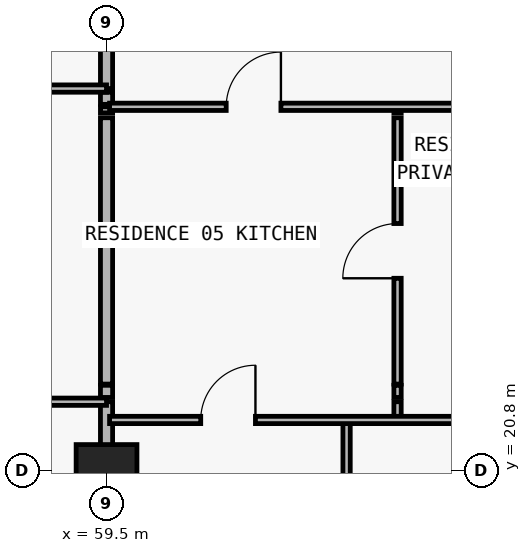
"""IFC4 building model, lengths in metres.
Left out: names, types, materials, properties, quantities, classifications, styles, units other than length and angle.
Written with IfcOpenShell. Run it as: python <this file> out.ifc"""

import sys

from ifc_helpers import new_model, si_unit, direction, frame, frame_2d, origin, origin_2d, place, context, subcontext, project, spatial, rectangle, extrude, element, fill, save


model = new_model("IFC4")
c1 = context("Model", 3, precision=1e-05, world=origin(), true_north=direction((0.0, 1.0)))
c2 = subcontext(c1, "Body", "Model", "MODEL_VIEW")
j1 = project(units=[si_unit("LENGTHUNIT", "METRE"), si_unit("PLANEANGLEUNIT", "RADIAN")], contexts=[c1])
p1 = place(None, origin())
s1 = spatial("IfcSite", under=j1, at=p1, CompositionType="ELEMENT")
p2 = place(p1, origin())
s2 = spatial("IfcBuilding", under=s1, at=p2, CompositionType="ELEMENT")
p3 = place(p2, frame((0.0, 0.0, 112.5)))
s3 = spatial("IfcBuildingStorey", under=s2, at=p3, CompositionType="ELEMENT", Elevation=112.5)
p4 = place(p3, frame((59.5, 20.8, 0.0), z_axis=(0.0, 0.0, 1.0), x_axis=(1.0, 0.0, 0.0)))
e1 = element("IfcColumn", 1, at=p4, inside=s3, PredefinedType="COLUMN", context=c2, shape_type="SweptSolid", body=[
    extrude(rectangle(XDim=1.0, YDim=0.85, at=origin_2d()), origin(), (0.0, 0.0, 1.0), 3.05),
])
p5 = place(p3, frame((59.5, 8.84, 0.0), z_axis=(0.0, 0.0, 1.0), x_axis=(0.0, 1.0, 0.0)))
e2 = element("IfcWall", 2, at=p5, inside=s3, PredefinedType="PARTITIONING", context=c2, shape_type="SweptSolid", body=[
    extrude(rectangle(XDim=13.09, YDim=0.2, at=frame_2d((6.545, 0.0))), origin(), (0.0, 0.0, 1.0), 2.174),
])
p6 = place(p3, frame((59.5, 22.0, 0.0), z_axis=(0.0, 0.0, 1.0), x_axis=(0.0, 1.0, 0.0)))
e3 = element("IfcWall", 3, at=p6, inside=s3, PredefinedType="PARTITIONING", context=c2, shape_type="SweptSolid", body=[
    extrude(rectangle(XDim=0.2, YDim=0.2, at=frame_2d((0.1, 0.0))), origin(), (0.0, 0.0, 1.0), 2.174),
])
p7 = place(p3, frame((59.5, 22.22, 0.0), z_axis=(0.0, 0.0, 1.0), x_axis=(0.0, 1.0, 0.0)))
e4 = element("IfcWall", 4, at=p7, inside=s3, PredefinedType="PARTITIONING", context=c2, shape_type="SweptSolid", body=[
    extrude(rectangle(XDim=4.38, YDim=0.2, at=frame_2d((2.19, 0.0))), origin(), (0.0, 0.0, 1.0), 2.174),
])
p8 = place(p3, frame((59.5, 26.68, 0.0), z_axis=(0.0, 0.0, 1.0), x_axis=(0.0, 1.0, 0.0)))
e5 = element("IfcWall", 5, at=p8, inside=s3, PredefinedType="PARTITIONING", context=c2, shape_type="SweptSolid", body=[
    extrude(rectangle(XDim=0.1, YDim=0.2, at=frame_2d((0.05, 0.0))), origin(), (0.0, 0.0, 1.0), 2.174),
])
p9 = place(p3, frame((59.5, 26.82, 0.0), z_axis=(0.0, 0.0, 1.0), x_axis=(0.0, 1.0, 0.0)))
e6 = element("IfcWall", 6, at=p9, inside=s3, PredefinedType="PARTITIONING", context=c2, shape_type="SweptSolid", body=[
    extrude(rectangle(XDim=0.2, YDim=0.2, at=frame_2d((0.1, 0.0))), origin(), (0.0, 0.0, 1.0), 2.174),
])
p10 = place(p3, frame((59.5, 27.08, 0.0), z_axis=(0.0, 0.0, 1.0), x_axis=(0.0, 1.0, 0.0)))
e7 = element("IfcWall", 7, at=p10, inside=s3, PredefinedType="PARTITIONING", context=c2, shape_type="SweptSolid", body=[
    extrude(rectangle(XDim=6.52, YDim=0.2, at=frame_2d((3.26, 0.0))), origin(), (0.0, 0.0, 1.0), 2.174),
])
p11 = place(p3, frame((63.448, 8.84, 0.0), z_axis=(0.0, 0.0, 1.0), x_axis=(0.0, 1.0, 0.0)))
e8 = element("IfcWall", 8, at=p11, inside=s3, PredefinedType="PARTITIONING", context=c2, shape_type="SweptSolid", body=[
    extrude(rectangle(XDim=12.79, YDim=0.12, at=frame_2d((6.395, 0.0))), origin(), (0.0, 0.0, 1.0), 3.05),
])
p12 = place(p3, frame((64.286, 21.63, 0.0), z_axis=(0.0, 0.0, 1.0), x_axis=(0.0, 1.0, 0.0)))
e9 = element("IfcWall", 9, at=p12, inside=s3, PredefinedType="PARTITIONING", context=c2, shape_type="SweptSolid", body=[
    extrude(rectangle(XDim=0.3, YDim=0.12, at=frame_2d((0.15, 0.0))), origin(), (0.0, 0.0, 1.0), 3.05),
])
p13 = place(p3, frame((64.286, 22.0, 0.0), z_axis=(0.0, 0.0, 1.0), x_axis=(0.0, 1.0, 0.0)))
e10 = element("IfcWall", 10, at=p13, inside=s3, PredefinedType="PARTITIONING", context=c2, shape_type="SweptSolid", body=[
    extrude(rectangle(XDim=0.2, YDim=0.12, at=frame_2d((0.1, 0.0))), origin(), (0.0, 0.0, 1.0), 3.05),
])
p14 = place(p3, frame((64.286, 22.22, 0.0), z_axis=(0.0, 0.0, 1.0), x_axis=(0.0, 1.0, 0.0)))
e11 = element("IfcWall", 11, at=p14, inside=s3, PredefinedType="PARTITIONING", context=c2, shape_type="SweptSolid", body=[
    extrude(rectangle(XDim=4.38, YDim=0.12, at=frame_2d((2.19, 0.0))), origin(), (0.0, 0.0, 1.0), 3.05),
])
p15 = place(p14, frame((1.74, 0.0, 0.0)))
e12 = element("IfcOpeningElement", 12, at=p15, cuts=e11, PredefinedType="OPENING", context=c2, shape_type="SweptSolid", body=[
    extrude(rectangle(XDim=0.9, YDim=2.15, at=frame_2d((0.45, 1.075))), frame((0.0, 0.07, 0.0), z_axis=(0.0, -1.0, 0.0), x_axis=(1.0, 0.0, 0.0)), (0.0, 0.0, 1.0), 0.14),
])
p16 = place(p3, frame((64.286, 26.68, 0.0), z_axis=(0.0, 0.0, 1.0), x_axis=(0.0, 1.0, 0.0)))
e13 = element("IfcWall", 13, at=p16, inside=s3, PredefinedType="PARTITIONING", context=c2, shape_type="SweptSolid", body=[
    extrude(rectangle(XDim=0.1, YDim=0.12, at=frame_2d((0.05, 0.0))), origin(), (0.0, 0.0, 1.0), 3.05),
])
p17 = place(p3, frame((59.55, 21.63, 0.0), z_axis=(0.0, 0.0, 1.0), x_axis=(1.0, 0.0, 0.0)))
e14 = element("IfcWall", 14, at=p17, inside=s3, PredefinedType="PARTITIONING", context=c2, shape_type="SweptSolid", body=[
    extrude(rectangle(XDim=8.35, YDim=0.12, at=frame_2d((4.175, 0.0))), origin(), (0.0, 0.0, 1.0), 3.05),
])
p18 = place(p17, frame((1.499, 0.0, 0.0)))
e15 = element("IfcOpeningElement", 15, at=p18, cuts=e14, PredefinedType="OPENING", context=c2, shape_type="SweptSolid", body=[
    extrude(rectangle(XDim=0.9, YDim=2.15, at=frame_2d((0.45, 1.075))), frame((0.0, 0.07, 0.0), z_axis=(0.0, -1.0, 0.0), x_axis=(1.0, 0.0, 0.0)), (0.0, 0.0, 1.0), 0.14),
])
p19 = place(p17, frame((6.093, 0.0, 0.0)))
e16 = element("IfcOpeningElement", 16, at=p19, cuts=e14, PredefinedType="OPENING", context=c2, shape_type="SweptSolid", body=[
    extrude(rectangle(XDim=0.9, YDim=2.15, at=frame_2d((0.45, 1.075))), frame((0.0, 0.07, 0.0), z_axis=(0.0, -1.0, 0.0), x_axis=(1.0, 0.0, 0.0)), (0.0, 0.0, 1.0), 0.14),
])
p20 = place(p3, frame((51.32, 21.93, 0.0), z_axis=(0.0, 0.0, 1.0), x_axis=(1.0, 0.0, 0.0)))
e17 = element("IfcWall", 17, at=p20, inside=s3, PredefinedType="PARTITIONING", context=c2, shape_type="SweptSolid", body=[
    extrude(rectangle(XDim=8.18, YDim=0.12, at=frame_2d((4.09, 0.0))), origin(), (0.0, 0.0, 1.0), 3.05),
])
p21 = place(p20, frame((1.708, 0.0, 0.0)))
e18 = element("IfcOpeningElement", 18, at=p21, cuts=e17, PredefinedType="OPENING", context=c2, shape_type="SweptSolid", body=[
    extrude(rectangle(XDim=0.9, YDim=2.15, at=frame_2d((0.45, 1.075))), frame((0.0, 0.07, 0.0), z_axis=(0.0, -1.0, 0.0), x_axis=(1.0, 0.0, 0.0)), (0.0, 0.0, 1.0), 0.14),
])
p22 = place(p20, frame((5.84, 0.0, 0.0)))
e19 = element("IfcOpeningElement", 19, at=p22, cuts=e17, PredefinedType="OPENING", context=c2, shape_type="SweptSolid", body=[
    extrude(rectangle(XDim=0.9, YDim=2.15, at=frame_2d((0.45, 1.075))), frame((0.0, 0.07, 0.0), z_axis=(0.0, -1.0, 0.0), x_axis=(1.0, 0.0, 0.0)), (0.0, 0.0, 1.0), 0.14),
])
p23 = place(p3, frame((59.55, 26.78, 0.0), z_axis=(0.0, 0.0, 1.0), x_axis=(1.0, 0.0, 0.0)))
e20 = element("IfcWall", 20, at=p23, inside=s3, PredefinedType="PARTITIONING", context=c2, shape_type="SweptSolid", body=[
    extrude(rectangle(XDim=8.35, YDim=0.12, at=frame_2d((4.175, 0.0))), origin(), (0.0, 0.0, 1.0), 3.05),
])
p24 = place(p23, frame((1.918, 0.0, 0.0)))
e21 = element("IfcOpeningElement", 21, at=p24, cuts=e20, PredefinedType="OPENING", context=c2, shape_type="SweptSolid", body=[
    extrude(rectangle(XDim=0.9, YDim=2.15, at=frame_2d((0.45, 1.075))), frame((0.0, 0.07, 0.0), z_axis=(0.0, -1.0, 0.0), x_axis=(1.0, 0.0, 0.0)), (0.0, 0.0, 1.0), 0.14),
])
p25 = place(p3, frame((51.32, 27.08, 0.0), z_axis=(0.0, 0.0, 1.0), x_axis=(1.0, 0.0, 0.0)))
e22 = element("IfcWall", 22, at=p25, inside=s3, PredefinedType="PARTITIONING", context=c2, shape_type="SweptSolid", body=[
    extrude(rectangle(XDim=8.18, YDim=0.12, at=frame_2d((4.09, 0.0))), origin(), (0.0, 0.0, 1.0), 3.05),
])
p26 = place(p25, frame((1.708, 0.0, 0.0)))
e23 = element("IfcOpeningElement", 23, at=p26, cuts=e22, PredefinedType="OPENING", context=c2, shape_type="SweptSolid", body=[
    extrude(rectangle(XDim=0.9, YDim=2.15, at=frame_2d((0.45, 1.075))), frame((0.0, 0.07, 0.0), z_axis=(0.0, -1.0, 0.0), x_axis=(1.0, 0.0, 0.0)), (0.0, 0.0, 1.0), 0.14),
])
p27 = place(p24, origin())
e24 = element("IfcDoor", 24, at=p27, inside=s3, OperationType="SINGLE_SWING_RIGHT", PredefinedType="DOOR", context=c2, shape_type="SweptSolid", body=[
    extrude(rectangle(XDim=0.9, YDim=2.15, at=frame_2d((0.45, 1.075))), frame((0.0, 0.025, 0.0), z_axis=(0.0, -1.0, 0.0), x_axis=(1.0, 0.0, 0.0)), (0.0, 0.0, 1.0), 0.05),
])
fill(e21, e24)
p28 = place(p15, origin())
e25 = element("IfcDoor", 25, at=p28, inside=s3, OperationType="SINGLE_SWING_LEFT", PredefinedType="DOOR", context=c2, shape_type="SweptSolid", body=[
    extrude(rectangle(XDim=0.9, YDim=2.15, at=frame_2d((0.45, 1.075))), frame((0.0, 0.025, 0.0), z_axis=(0.0, -1.0, 0.0), x_axis=(1.0, 0.0, 0.0)), (0.0, 0.0, 1.0), 0.05),
])
fill(e12, e25)
p29 = place(p18, origin())
e26 = element("IfcDoor", 26, at=p29, inside=s3, OperationType="SINGLE_SWING_RIGHT", PredefinedType="DOOR", context=c2, shape_type="SweptSolid", body=[
    extrude(rectangle(XDim=0.9, YDim=2.15, at=frame_2d((0.45, 1.075))), frame((0.0, 0.025, 0.0), z_axis=(0.0, -1.0, 0.0), x_axis=(1.0, 0.0, 0.0)), (0.0, 0.0, 1.0), 0.05),
])
fill(e15, e26)
save(model, sys.argv[1])
